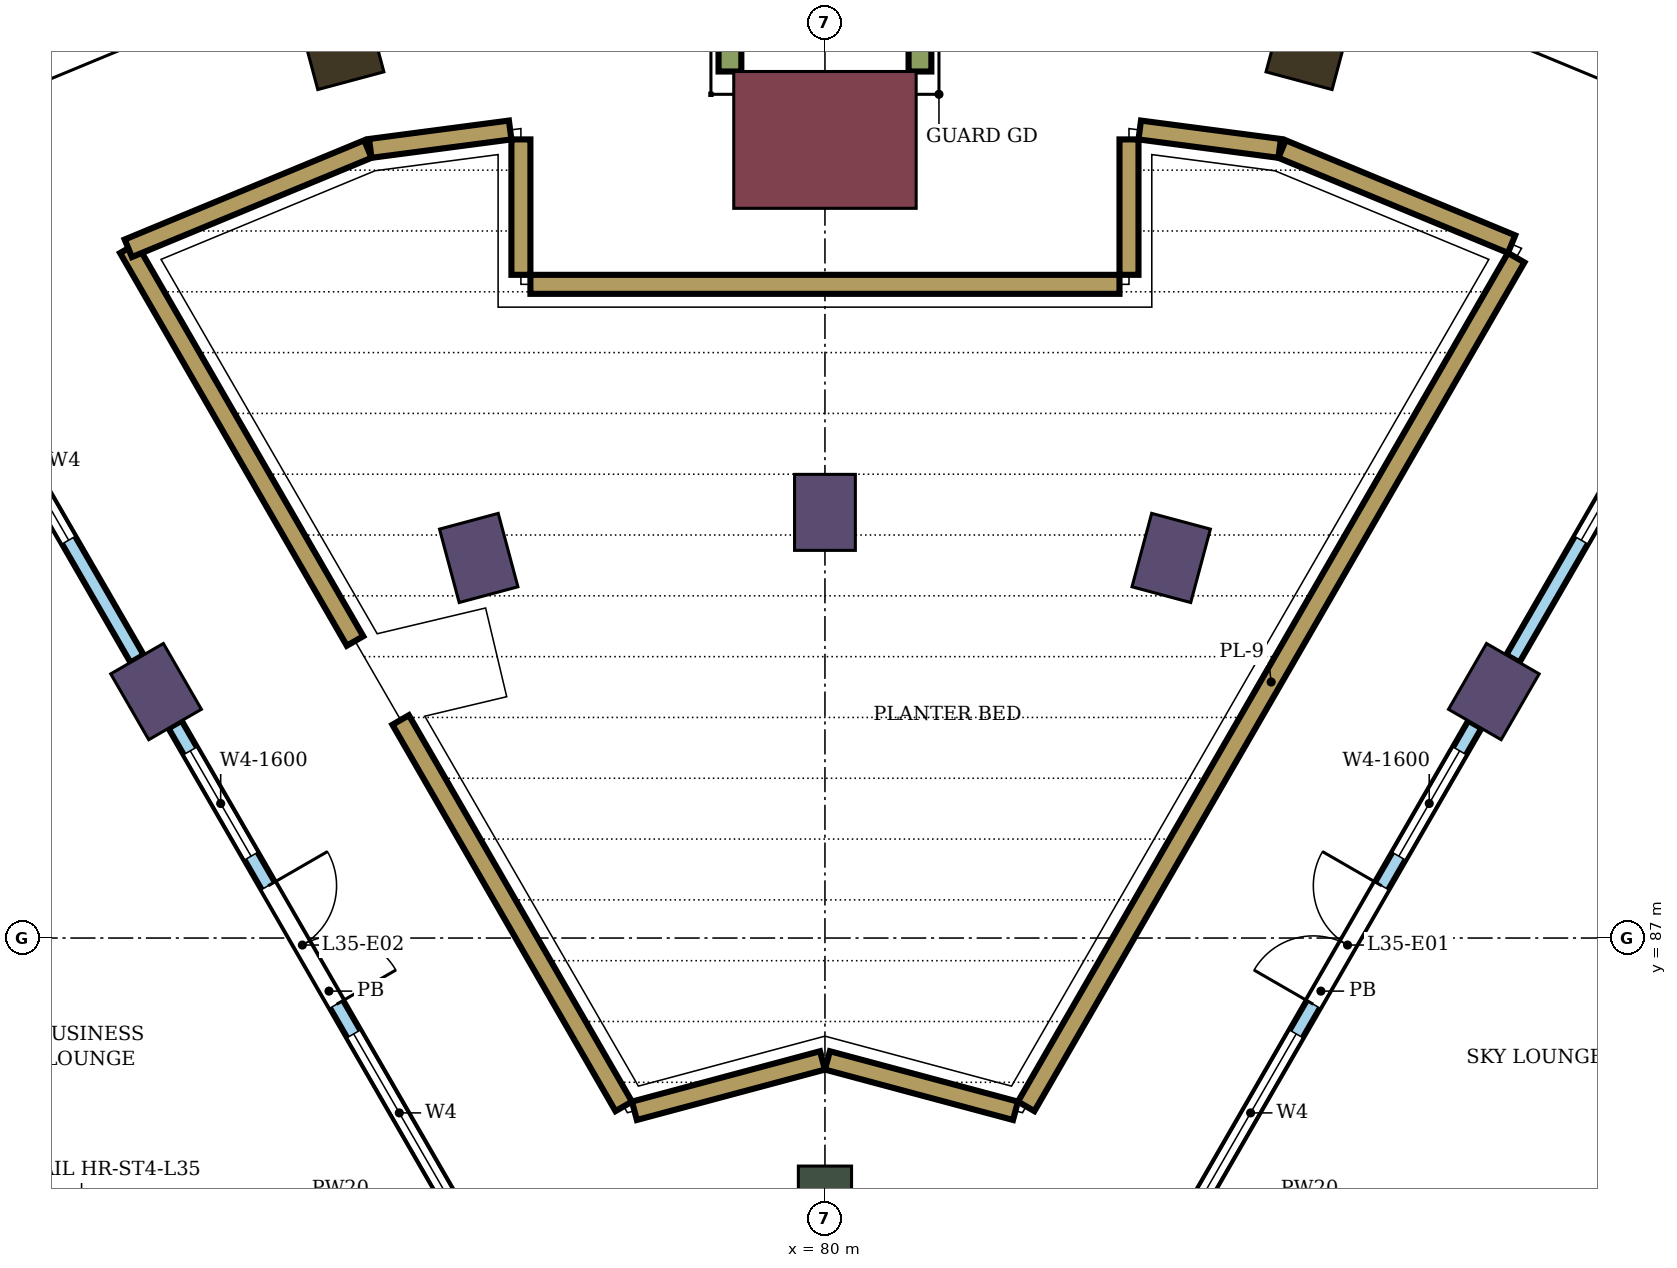
"""IFC4 building model, lengths in metres.
Left out: names, types, materials, properties, quantities, classifications, styles, units other than length and angle.
Written with IfcOpenShell. Run it as: python <this file> out.ifc"""

import sys

from ifc_helpers import new_model, si_unit, direction, frame, frame_2d, origin, origin_2d, place, context, subcontext, project, spatial, rectangle, extrude, element, fill, save


model = new_model("IFC4")
c1 = context("Model", 3, precision=1e-05, world=origin(), true_north=direction((0.0, 1.0)))
c2 = subcontext(c1, "Body", "Model", "MODEL_VIEW")
j1 = project(units=[si_unit("LENGTHUNIT", "METRE"), si_unit("PLANEANGLEUNIT", "RADIAN")], contexts=[c1])
p1 = place(None, origin())
s1 = spatial("IfcSite", under=j1, at=p1, CompositionType="ELEMENT")
p2 = place(p1, origin())
s2 = spatial("IfcBuilding", under=s1, at=p2, CompositionType="ELEMENT")
p3 = place(p2, frame((0.0, 0.0, 149.7)))
s3 = spatial("IfcBuildingStorey", under=s2, at=p3, CompositionType="ELEMENT", Elevation=149.7)
for number, where, z_axis, x_axis in (
    (1, (86.367, 98.762, 0.0), (0.0, 0.0, 1.0), (0.259, 0.966, 0.0)),
    (2, (73.633, 98.762, 0.0), (0.0, 0.0, 1.0), (-0.259, 0.966, 0.0)),
):
    element("IfcColumn", number, at=place(p3, frame(where, z_axis=z_axis, x_axis=x_axis)), inside=s3, PredefinedType="COLUMN", context=c2, shape_type="SweptSolid", body=[
        extrude(rectangle(XDim=1.0, YDim=0.9, at=origin_2d()), origin(), (0.0, 0.0, 1.0), 8.0),
    ])
for number, where, z_axis, x_axis in (
    (3, (88.8, 90.242, 0.0), (0.0, 0.0, 1.0), (0.5, 0.866, 0.0)),
    (4, (84.555, 92.0, 0.0), (0.0, 0.0, 1.0), (0.259, 0.966, 0.0)),
    (5, (80.0, 92.6, 0.0), (0.0, 0.0, 1.0), (0.0, 1.0, 0.0)),
    (6, (75.445, 92.0, 0.0), (0.0, 0.0, 1.0), (-0.259, 0.966, 0.0)),
    (7, (71.2, 90.242, 0.0), (0.0, 0.0, 1.0), (-0.5, 0.866, 0.0)),
):
    element("IfcColumn", number, at=place(p3, frame(where, z_axis=z_axis, x_axis=x_axis)), inside=s3, PredefinedType="COLUMN", context=c2, shape_type="SweptSolid", body=[
        extrude(rectangle(XDim=1.0, YDim=0.8, at=origin_2d()), origin(), (0.0, 0.0, 1.0), 8.0),
    ])
p4 = place(p3, frame((80.0, 83.6, 0.0), z_axis=(0.0, 0.0, 1.0), x_axis=(0.0, 1.0, 0.0)))
e8 = element("IfcColumn", 8, at=p4, inside=s3, PredefinedType="COLUMN", context=c2, shape_type="SweptSolid", body=[
    extrude(rectangle(XDim=0.8, YDim=0.7, at=origin_2d()), origin(), (0.0, 0.0, 1.0), 8.0),
])
p5 = place(p3, frame((80.0, 97.5, 0.0), z_axis=(0.0, 0.0, 1.0), x_axis=(0.0, 1.0, 0.0)))
e9 = element("IfcColumn", 9, at=p5, inside=s3, PredefinedType="COLUMN", context=c2, shape_type="SweptSolid", body=[
    extrude(rectangle(XDim=1.8, YDim=2.4, at=origin_2d()), origin(), (0.0, 0.0, 1.0), 8.0),
])
for number, where, z_axis, x_axis in (
    (10, (81.25, 98.4, 0.0), (0.0, 0.0, 1.0), (0.0, 1.0, 0.0)),
    (11, (78.75, 98.4, 0.0), (0.0, 0.0, 1.0), (0.0, 1.0, 0.0)),
):
    element("IfcWall", number, at=place(p3, frame(where, z_axis=z_axis, x_axis=x_axis)), inside=s3, PredefinedType="NOTDEFINED", context=c2, shape_type="SweptSolid", body=[
        extrude(rectangle(XDim=2.416, YDim=0.3, at=frame_2d((1.208, 0.0))), origin(), (0.0, 0.0, 1.0), 8.0),
    ])
p6 = place(p3, frame((70.835, 96.074, 0.0), z_axis=(0.0, 0.0, 1.0), x_axis=(0.500003486784, -0.866023390679, 0.0)))
e12 = element("IfcWall", 12, at=p6, inside=s3, PredefinedType="USERDEFINED", context=c2, shape_type="SweptSolid", body=[
    extrude(rectangle(XDim=5.966, YDim=0.25, at=frame_2d((2.983, 0.0))), origin(), (0.0, 0.0, 1.0), 0.6),
])
p7 = place(p3, frame((74.418, 89.869, 0.0), z_axis=(0.0, 0.0, 1.0), x_axis=(0.499999689456, -0.866025583077, 0.0)))
e13 = element("IfcWall", 13, at=p7, inside=s3, PredefinedType="USERDEFINED", context=c2, shape_type="SweptSolid", body=[
    extrude(rectangle(XDim=5.87, YDim=0.25, at=frame_2d((2.935, 0.0))), origin(), (0.0, 0.0, 1.0), 0.6),
])
for number, where, z_axis, x_axis in (
    (14, (77.493, 84.727, 0.0), (0.0, 0.0, 1.0), (0.966, 0.259, 0.0)),
    (15, (80.032, 85.39, 0.0), (0.0, 0.0, 1.0), (0.966, -0.259, 0.0)),
):
    element("IfcWall", number, at=place(p3, frame(where, z_axis=z_axis, x_axis=x_axis)), inside=s3, PredefinedType="USERDEFINED", context=c2, shape_type="SweptSolid", body=[
        extrude(rectangle(XDim=2.562, YDim=0.25, at=frame_2d((1.281, 0.0))), origin(), (0.0, 0.0, 1.0), 0.6),
    ])
p8 = place(p3, frame((82.647, 84.785, 0.0), z_axis=(0.0, 0.0, 1.0), x_axis=(0.499992370413, 0.866029808684, 0.0)))
e16 = element("IfcWall", 16, at=p8, inside=s3, PredefinedType="USERDEFINED", context=c2, shape_type="SweptSolid", body=[
    extrude(rectangle(XDim=12.893, YDim=0.25, at=frame_2d((6.446, 0.0))), origin(), (0.0, 0.0, 1.0), 0.6),
])
p9 = place(p3, frame((89.033, 96.129, 0.0), z_axis=(0.0, 0.0, 1.0), x_axis=(-0.923863886655, 0.382721202621, 0.0)))
e17 = element("IfcWall", 17, at=p9, inside=s3, PredefinedType="USERDEFINED", context=c2, shape_type="SweptSolid", body=[
    extrude(rectangle(XDim=3.269, YDim=0.25, at=frame_2d((1.634, 0.0))), origin(), (0.0, 0.0, 1.0), 0.6),
])
p10 = place(p3, frame((85.982, 97.388, 0.0), z_axis=(0.0, 0.0, 1.0), x_axis=(-0.991436829887, 0.130587182926, 0.0)))
e18 = element("IfcWall", 18, at=p10, inside=s3, PredefinedType="USERDEFINED", context=c2, shape_type="SweptSolid", body=[
    extrude(rectangle(XDim=1.856, YDim=0.25, at=frame_2d((0.928, 0.0))), origin(), (0.0, 0.0, 1.0), 0.6),
])
p11 = place(p3, frame((84.0, 97.507, 0.0), z_axis=(0.0, 0.0, 1.0), x_axis=(0.0, -1.0, 0.0)))
e19 = element("IfcWall", 19, at=p11, inside=s3, PredefinedType="USERDEFINED", context=c2, shape_type="SweptSolid", body=[
    extrude(rectangle(XDim=1.781, YDim=0.25, at=frame_2d((0.891, 0.0))), origin(), (0.0, 0.0, 1.0), 0.6),
])
p12 = place(p3, frame((83.875, 95.6, 0.0), z_axis=(0.0, 0.0, 1.0), x_axis=(-1.0, 0.0, 0.0)))
e20 = element("IfcWall", 20, at=p12, inside=s3, PredefinedType="USERDEFINED", context=c2, shape_type="SweptSolid", body=[
    extrude(rectangle(XDim=7.75, YDim=0.25, at=frame_2d((3.875, 0.0))), origin(), (0.0, 0.0, 1.0), 0.6),
])
p13 = place(p3, frame((76.0, 95.725, 0.0), z_axis=(0.0, 0.0, 1.0), x_axis=(0.0, 1.0, 0.0)))
e21 = element("IfcWall", 21, at=p13, inside=s3, PredefinedType="USERDEFINED", context=c2, shape_type="SweptSolid", body=[
    extrude(rectangle(XDim=1.781, YDim=0.25, at=frame_2d((0.891, 0.0))), origin(), (0.0, 0.0, 1.0), 0.6),
])
p14 = place(p3, frame((75.859, 97.631, 0.0), z_axis=(0.0, 0.0, 1.0), x_axis=(-0.991436829887, -0.130587182926, 0.0)))
e22 = element("IfcWall", 22, at=p14, inside=s3, PredefinedType="USERDEFINED", context=c2, shape_type="SweptSolid", body=[
    extrude(rectangle(XDim=1.856, YDim=0.25, at=frame_2d((0.928, 0.0))), origin(), (0.0, 0.0, 1.0), 0.6),
])
p15 = place(p3, frame((73.986, 97.38, 0.0), z_axis=(0.0, 0.0, 1.0), x_axis=(-0.923871147788, -0.38270367425, 0.0)))
e23 = element("IfcWall", 23, at=p15, inside=s3, PredefinedType="USERDEFINED", context=c2, shape_type="SweptSolid", body=[
    extrude(rectangle(XDim=3.411, YDim=0.25, at=frame_2d((1.706, 0.0))), origin(), (0.0, 0.0, 1.0), 0.6),
])
p16 = place(p3, frame((84.5, 82.794, 0.0), z_axis=(0.0, 0.0, 1.0), x_axis=(0.499999880539, 0.866025472755, 0.0)))
e24 = element("IfcWall", 24, at=p16, inside=s3, PredefinedType="NOTDEFINED", context=c2, shape_type="SweptSolid", body=[
    extrude(rectangle(XDim=8.1, YDim=0.2, at=frame_2d((4.05, 0.0))), origin(), (0.0, 0.0, 1.0), 8.0),
])
p17 = place(p16, frame((1.0, 0.0, 0.3)))
e25 = element("IfcOpeningElement", 25, at=p17, cuts=e24, PredefinedType="OPENING", context=c2, shape_type="SweptSolid", body=[
    extrude(rectangle(XDim=2.4, YDim=3.6, at=frame_2d((1.2, 1.8))), frame((0.0, 0.11, 0.0), z_axis=(0.0, -1.0, 0.0), x_axis=(1.0, 0.0, 0.0)), (0.0, 0.0, 1.0), 0.22),
])
p18 = place(p16, frame((3.85, 0.0, 0.0)))
e26 = element("IfcOpeningElement", 26, at=p18, cuts=e24, PredefinedType="OPENING", context=c2, shape_type="SweptSolid", body=[
    extrude(rectangle(XDim=1.8, YDim=2.4, at=frame_2d((0.9, 1.2))), frame((0.0, 0.11, 0.0), z_axis=(0.0, -1.0, 0.0), x_axis=(1.0, 0.0, 0.0)), (0.0, 0.0, 1.0), 0.22),
])
p19 = place(p16, frame((6.1, 0.0, 0.3)))
e27 = element("IfcOpeningElement", 27, at=p19, cuts=e24, PredefinedType="OPENING", context=c2, shape_type="SweptSolid", body=[
    extrude(rectangle(XDim=1.6, YDim=3.6, at=frame_2d((0.8, 1.8))), frame((0.0, 0.11, 0.0), z_axis=(0.0, -1.0, 0.0), x_axis=(1.0, 0.0, 0.0)), (0.0, 0.0, 1.0), 0.22),
])
p20 = place(p3, frame((89.05, 90.675, 0.0), z_axis=(0.0, 0.0, 1.0), x_axis=(0.500007758305, 0.866020924479, 0.0)))
e28 = element("IfcWall", 28, at=p20, inside=s3, PredefinedType="NOTDEFINED", context=c2, shape_type="SweptSolid", body=[
    extrude(rectangle(XDim=6.0, YDim=0.2, at=frame_2d((3.0, 0.0))), origin(), (0.0, 0.0, 1.0), 8.0),
])
p21 = place(p20, frame((1.8, 0.0, 0.3)))
e29 = element("IfcOpeningElement", 29, at=p21, cuts=e28, PredefinedType="OPENING", context=c2, shape_type="SweptSolid", body=[
    extrude(rectangle(XDim=2.4, YDim=3.6, at=frame_2d((1.2, 1.8))), frame((0.0, 0.11, 0.0), z_axis=(0.0, -1.0, 0.0), x_axis=(1.0, 0.0, 0.0)), (0.0, 0.0, 1.0), 0.22),
])
p22 = place(p3, frame((75.5, 82.794, 0.0), z_axis=(0.0, 0.0, 1.0), x_axis=(-0.499999880539, 0.866025472755, 0.0)))
e30 = element("IfcWall", 30, at=p22, inside=s3, PredefinedType="NOTDEFINED", context=c2, shape_type="SweptSolid", body=[
    extrude(rectangle(XDim=8.1, YDim=0.2, at=frame_2d((4.05, 0.0))), origin(), (0.0, 0.0, 1.0), 8.0),
])
p23 = place(p22, frame((1.0, 0.0, 0.3)))
e31 = element("IfcOpeningElement", 31, at=p23, cuts=e30, PredefinedType="OPENING", context=c2, shape_type="SweptSolid", body=[
    extrude(rectangle(XDim=2.4, YDim=3.6, at=frame_2d((1.2, 1.8))), frame((0.0, 0.11, 0.0), z_axis=(0.0, -1.0, 0.0), x_axis=(1.0, 0.0, 0.0)), (0.0, 0.0, 1.0), 0.22),
])
p24 = place(p22, frame((3.85, 0.0, 0.0)))
e32 = element("IfcOpeningElement", 32, at=p24, cuts=e30, PredefinedType="OPENING", context=c2, shape_type="SweptSolid", body=[
    extrude(rectangle(XDim=1.8, YDim=2.4, at=frame_2d((0.9, 1.2))), frame((0.0, 0.11, 0.0), z_axis=(0.0, -1.0, 0.0), x_axis=(1.0, 0.0, 0.0)), (0.0, 0.0, 1.0), 0.22),
])
p25 = place(p22, frame((6.1, 0.0, 0.3)))
e33 = element("IfcOpeningElement", 33, at=p25, cuts=e30, PredefinedType="OPENING", context=c2, shape_type="SweptSolid", body=[
    extrude(rectangle(XDim=1.6, YDim=3.6, at=frame_2d((0.8, 1.8))), frame((0.0, 0.11, 0.0), z_axis=(0.0, -1.0, 0.0), x_axis=(1.0, 0.0, 0.0)), (0.0, 0.0, 1.0), 0.22),
])
p26 = place(p3, frame((70.95, 90.675, 0.0), z_axis=(0.0, 0.0, 1.0), x_axis=(-0.500007758305, 0.866020924479, 0.0)))
e34 = element("IfcWall", 34, at=p26, inside=s3, PredefinedType="NOTDEFINED", context=c2, shape_type="SweptSolid", body=[
    extrude(rectangle(XDim=6.0, YDim=0.2, at=frame_2d((3.0, 0.0))), origin(), (0.0, 0.0, 1.0), 8.0),
])
p27 = place(p26, frame((1.8, 0.0, 0.3)))
e35 = element("IfcOpeningElement", 35, at=p27, cuts=e34, PredefinedType="OPENING", context=c2, shape_type="SweptSolid", body=[
    extrude(rectangle(XDim=2.4, YDim=3.6, at=frame_2d((1.2, 1.8))), frame((0.0, 0.11, 0.0), z_axis=(0.0, -1.0, 0.0), x_axis=(1.0, 0.0, 0.0)), (0.0, 0.0, 1.0), 0.22),
])
p28 = place(p17, origin())
e36 = element("IfcWindow", 36, at=p28, inside=s3, PartitioningType="SINGLE_PANEL", PredefinedType="WINDOW", context=c2, shape_type="SweptSolid", body=[
    extrude(rectangle(XDim=2.4, YDim=3.6, at=frame_2d((1.2, 1.8))), frame((0.0, 0.03, 0.0), z_axis=(0.0, -1.0, 0.0), x_axis=(1.0, 0.0, 0.0)), (0.0, 0.0, 1.0), 0.06),
])
fill(e25, e36)
p29 = place(p18, origin())
e37 = element("IfcDoor", 37, at=p29, inside=s3, OperationType="DOUBLE_DOOR_SINGLE_SWING", PredefinedType="DOOR", context=c2, shape_type="SweptSolid", body=[
    extrude(rectangle(XDim=1.8, YDim=2.4, at=frame_2d((0.9, 1.2))), frame((0.0, 0.025, 0.0), z_axis=(0.0, -1.0, 0.0), x_axis=(1.0, 0.0, 0.0)), (0.0, 0.0, 1.0), 0.05),
])
fill(e26, e37)
p30 = place(p19, origin())
e38 = element("IfcWindow", 38, at=p30, inside=s3, PartitioningType="SINGLE_PANEL", PredefinedType="WINDOW", context=c2, shape_type="SweptSolid", body=[
    extrude(rectangle(XDim=1.6, YDim=3.6, at=frame_2d((0.8, 1.8))), frame((0.0, 0.03, 0.0), z_axis=(0.0, -1.0, 0.0), x_axis=(1.0, 0.0, 0.0)), (0.0, 0.0, 1.0), 0.06),
])
fill(e27, e38)
p31 = place(p21, origin())
e39 = element("IfcWindow", 39, at=p31, inside=s3, PartitioningType="SINGLE_PANEL", PredefinedType="WINDOW", context=c2, shape_type="SweptSolid", body=[
    extrude(rectangle(XDim=2.4, YDim=3.6, at=frame_2d((1.2, 1.8))), frame((0.0, 0.03, 0.0), z_axis=(0.0, -1.0, 0.0), x_axis=(1.0, 0.0, 0.0)), (0.0, 0.0, 1.0), 0.06),
])
fill(e29, e39)
p32 = place(p23, origin())
e40 = element("IfcWindow", 40, at=p32, inside=s3, PartitioningType="SINGLE_PANEL", PredefinedType="WINDOW", context=c2, shape_type="SweptSolid", body=[
    extrude(rectangle(XDim=2.4, YDim=3.6, at=frame_2d((1.2, 1.8))), frame((0.0, 0.03, 0.0), z_axis=(0.0, -1.0, 0.0), x_axis=(1.0, 0.0, 0.0)), (0.0, 0.0, 1.0), 0.06),
])
fill(e31, e40)
p33 = place(p24, frame((1.8, 0.0, 0.0), z_axis=(0.0, 0.0, 1.0), x_axis=(-1.0, 0.0, 0.0)))
e41 = element("IfcDoor", 41, at=p33, inside=s3, OperationType="DOUBLE_DOOR_SINGLE_SWING", PredefinedType="DOOR", context=c2, shape_type="SweptSolid", body=[
    extrude(rectangle(XDim=1.8, YDim=2.4, at=frame_2d((0.9, 1.2))), frame((0.0, 0.025, 0.0), z_axis=(0.0, -1.0, 0.0), x_axis=(1.0, 0.0, 0.0)), (0.0, 0.0, 1.0), 0.05),
])
fill(e32, e41)
p34 = place(p25, origin())
e42 = element("IfcWindow", 42, at=p34, inside=s3, PartitioningType="SINGLE_PANEL", PredefinedType="WINDOW", context=c2, shape_type="SweptSolid", body=[
    extrude(rectangle(XDim=1.6, YDim=3.6, at=frame_2d((0.8, 1.8))), frame((0.0, 0.03, 0.0), z_axis=(0.0, -1.0, 0.0), x_axis=(1.0, 0.0, 0.0)), (0.0, 0.0, 1.0), 0.06),
])
fill(e33, e42)
p35 = place(p27, origin())
e43 = element("IfcWindow", 43, at=p35, inside=s3, PartitioningType="SINGLE_PANEL", PredefinedType="WINDOW", context=c2, shape_type="SweptSolid", body=[
    extrude(rectangle(XDim=2.4, YDim=3.6, at=frame_2d((1.2, 1.8))), frame((0.0, 0.03, 0.0), z_axis=(0.0, -1.0, 0.0), x_axis=(1.0, 0.0, 0.0)), (0.0, 0.0, 1.0), 0.06),
])
fill(e35, e43)
save(model, sys.argv[1])
